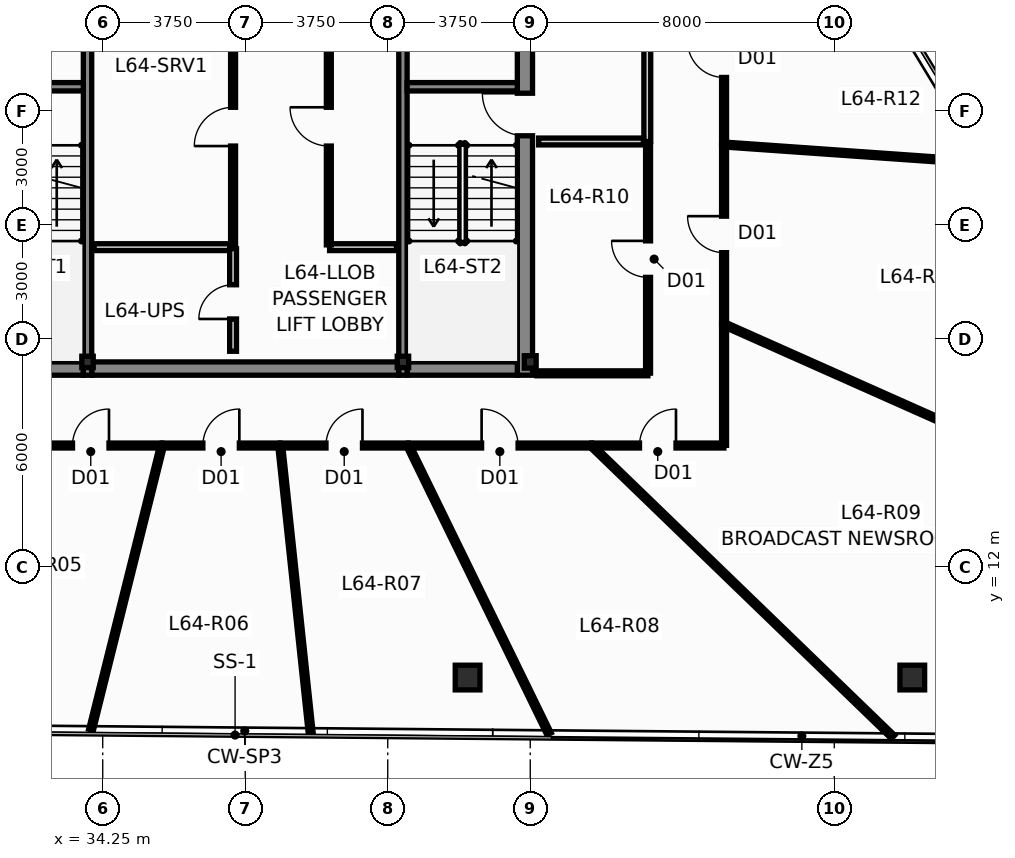
"""IFC4 building model, lengths in metres.
Left out: names, types, materials, properties, quantities, classifications, styles, units other than length and angle.
Written with IfcOpenShell. Run it as: python <this file> out.ifc"""

import sys

from ifc_helpers import new_model, si_unit, direction, frame, frame_2d, origin, origin_2d, place, context, subcontext, project, spatial, rectangle, hollow_rectangle, i_section, extrude, source, transform, mapped, element, fill, save


model = new_model("IFC4")
c1 = context("Model", 3, precision=1e-05, world=origin(), true_north=direction((0.0, 1.0)))
c2 = subcontext(c1, "Body", "Model", "MODEL_VIEW")
j1 = project(units=[si_unit("LENGTHUNIT", "METRE"), si_unit("PLANEANGLEUNIT", "RADIAN")], contexts=[c1])
p1 = place(None, origin())
s1 = spatial("IfcSite", under=j1, at=p1, CompositionType="ELEMENT")
p2 = place(p1, origin())
s2 = spatial("IfcBuilding", under=s1, at=p2, CompositionType="ELEMENT")
p3 = place(p2, frame((0.0, 0.0, 244.45)))
s3 = spatial("IfcBuildingStorey", under=s2, at=p3, CompositionType="ELEMENT", Elevation=244.45)
m1 = source(origin(), c2, "Body", "SweptSolid", [
    extrude(i_section(OverallWidth=0.311, OverallDepth=0.327, WebThickness=0.016, FlangeThickness=0.025, at=origin_2d()), origin(), (0.0, 0.0, 1.0), 3.65),
])
p4 = place(p3, frame((45.5, 17.4, 0.0), z_axis=(0.0, 0.0, 1.0), x_axis=(1.0, 0.0, 0.0)))
e1 = element("IfcColumn", 1, at=p4, inside=s3, PredefinedType="COLUMN", context=c2, shape_type="MappedRepresentation", body=[
    mapped(m1, transform((0.0, 0.0, 0.0), scale=1.0)),
])
m2 = source(origin(), c2, "Body", "SweptSolid", [
    extrude(hollow_rectangle(XDim=0.3, YDim=0.3, WallThickness=0.012, at=origin_2d()), origin(), (0.0, 0.0, 1.0), 3.65),
])
for number, where, z_axis, x_axis in (
    (2, (33.85, 17.4, 0.0), (0.0, 0.0, 1.0), (1.0, 0.0, 0.0)),
    (3, (42.15, 17.4, 0.0), (0.0, 0.0, 1.0), (1.0, 0.0, 0.0)),
):
    element("IfcColumn", number, at=place(p3, frame(where, z_axis=z_axis, x_axis=x_axis)), inside=s3, PredefinedType="COLUMN", context=c2, shape_type="MappedRepresentation", body=[
        mapped(m2, transform((0.0, 0.0, 0.0), scale=1.0)),
    ])
p5 = place(p3, frame((45.36, 17.05, 0.0), z_axis=(0.0, 0.0, 1.0), x_axis=(0.0, 1.0, 0.0)))
e4 = element("IfcWall", 4, at=p5, inside=s3, PredefinedType="SHEAR", context=c2, shape_type="SweptSolid", body=[
    extrude(rectangle(XDim=13.125, YDim=0.4, at=frame_2d((6.562, 0.0))), origin(), (0.0, 0.0, 1.0), 3.65),
])
p6 = place(p5, frame((6.3, 0.0, 0.0)))
e5 = element("IfcOpeningElement", 5, at=p6, cuts=e4, PredefinedType="OPENING", context=c2, shape_type="SweptSolid", body=[
    extrude(rectangle(XDim=1.12, YDim=2.15, at=frame_2d((0.56, 1.075))), frame((0.0, 0.212, 0.0), z_axis=(0.0, -1.0, 0.0), x_axis=(1.0, 0.0, 0.0)), (0.0, 0.0, 1.0), 0.424),
])
p7 = place(p5, frame((10.75, 0.0, 0.0)))
e6 = element("IfcOpeningElement", 6, at=p7, cuts=e4, PredefinedType="OPENING", context=c2, shape_type="SweptSolid", body=[
    extrude(rectangle(XDim=1.2, YDim=2.2, at=frame_2d((0.6, 1.1))), frame((0.0, 0.212, 0.0), z_axis=(0.0, -1.0, 0.0), x_axis=(1.0, 0.0, 0.0)), (0.0, 0.0, 1.0), 0.424),
])
p8 = place(p3, frame((30.84, 17.225, 0.0), z_axis=(0.0, 0.0, 1.0), x_axis=(1.0, 0.0, 0.0)))
e7 = element("IfcWall", 7, at=p8, inside=s3, PredefinedType="SHEAR", context=c2, shape_type="SweptSolid", body=[
    extrude(rectangle(XDim=2.9, YDim=0.35, at=frame_2d((1.45, 0.0))), origin(), (0.0, 0.0, 1.0), 3.65),
])
p9 = place(p3, frame((33.96, 17.225, 0.0), z_axis=(0.0, 0.0, 1.0), x_axis=(1.0, 0.0, 0.0)))
e8 = element("IfcWall", 8, at=p9, inside=s3, PredefinedType="SHEAR", context=c2, shape_type="SweptSolid", body=[
    extrude(rectangle(XDim=8.08, YDim=0.35, at=frame_2d((4.04, 0.0))), origin(), (0.0, 0.0, 1.0), 3.65),
])
p10 = place(p3, frame((42.26, 17.225, 0.0), z_axis=(0.0, 0.0, 1.0), x_axis=(1.0, 0.0, 0.0)))
e9 = element("IfcWall", 9, at=p10, inside=s3, PredefinedType="SHEAR", context=c2, shape_type="SweptSolid", body=[
    extrude(rectangle(XDim=2.9, YDim=0.35, at=frame_2d((1.45, 0.0))), origin(), (0.0, 0.0, 1.0), 3.65),
])
for number, where, z_axis, x_axis in (
    (10, (33.85, 17.05, 0.0), (0.0, 0.0, 1.0), (0.0, 1.0, 0.0)),
    (11, (42.15, 17.05, 0.0), (0.0, 0.0, 1.0), (0.0, 1.0, 0.0)),
):
    element("IfcWall", number, at=place(p3, frame(where, z_axis=z_axis, x_axis=x_axis)), inside=s3, PredefinedType="SHEAR", context=c2, shape_type="SweptSolid", body=[
        extrude(rectangle(XDim=13.125, YDim=0.22, at=frame_2d((6.562, 0.0))), origin(), (0.0, 0.0, 1.0), 3.65),
    ])
for number, where, z_axis, x_axis in (
    (12, (30.84, 24.64, 0.0), (0.0, 0.0, 1.0), (1.0, 0.0, 0.0)),
    (13, (42.26, 24.64, 0.0), (0.0, 0.0, 1.0), (1.0, 0.0, 0.0)),
):
    element("IfcWall", number, at=place(p3, frame(where, z_axis=z_axis, x_axis=x_axis)), inside=s3, PredefinedType="SHEAR", context=c2, shape_type="SweptSolid", body=[
        extrude(rectangle(XDim=2.9, YDim=0.22, at=frame_2d((1.45, 0.0))), origin(), (0.0, 0.0, 1.0), 3.65),
    ])
m3 = source(origin(), c2, "Body", "SweptSolid", [
    extrude(hollow_rectangle(XDim=0.65, YDim=0.65, WallThickness=0.04, at=origin_2d()), origin(), (0.0, 0.0, 1.0), 3.651),
])
p11 = place(p3, frame((43.851, 9.095, 0.0), z_axis=(0.004480382638, 0.019793929266, 0.999794042058), x_axis=(-0.975326687046, 0.220766513622, 0.0)))
e14 = element("IfcColumn", 14, at=p11, inside=s3, PredefinedType="COLUMN", context=c2, shape_type="MappedRepresentation", body=[
    mapped(m3, transform((0.0, 0.0, 0.0), scale=1.0)),
])
m4 = source(origin(), c2, "Body", "SweptSolid", [
    extrude(hollow_rectangle(XDim=0.65, YDim=0.65, WallThickness=0.04, at=origin_2d()), origin(), (0.0, 0.0, 1.0), 3.651),
])
p12 = place(p3, frame((55.553, 9.095, 0.0), z_axis=(0.013440068782, 0.019792340097, 0.999713772949), x_axis=(-0.827290216258, 0.561774775229, 0.0)))
e15 = element("IfcColumn", 15, at=p12, inside=s3, PredefinedType="COLUMN", context=c2, shape_type="MappedRepresentation", body=[
    mapped(m4, transform((0.0, 0.0, 0.0), scale=1.0)),
])
p13 = place(p3, frame((48.58, 23.2, 0.0), z_axis=(0.0, 0.0, 1.0), x_axis=(0.0, 1.0, 0.0)))
e16 = element("IfcWall", 16, at=p13, inside=s3, PredefinedType="PARTITIONING", context=c2, shape_type="SweptSolid", body=[
    extrude(rectangle(XDim=6.4, YDim=0.18, at=frame_2d((3.2, 0.0))), origin(), (0.0, 0.0, 1.0), 3.129),
])
p14 = place(p13, frame((2.65, 0.0, 0.0)))
e17 = element("IfcOpeningElement", 17, at=p14, cuts=e16, PredefinedType="OPENING", context=c2, shape_type="SweptSolid", body=[
    extrude(rectangle(XDim=1.05, YDim=2.15, at=frame_2d((0.525, 1.075))), frame((0.0, 0.102, 0.0), z_axis=(0.0, -1.0, 0.0), x_axis=(1.0, 0.0, 0.0)), (0.0, 0.0, 1.0), 0.204),
])
p15 = place(p3, frame((45.72, 23.2, 0.0), z_axis=(0.0, 0.0, 1.0), x_axis=(1.0, 0.0, 0.0)))
e18 = element("IfcWall", 18, at=p15, inside=s3, PredefinedType="PARTITIONING", context=c2, shape_type="SweptSolid", body=[
    extrude(rectangle(XDim=2.76, YDim=0.18, at=frame_2d((1.38, 0.0))), origin(), (0.0, 0.0, 1.0), 3.4),
])
p16 = place(p3, frame((34.02, 20.42, 0.0), z_axis=(0.0, 0.0, 1.0), x_axis=(1.0, 0.0, 0.0)))
e19 = element("IfcWall", 19, at=p16, inside=s3, PredefinedType="PARTITIONING", context=c2, shape_type="SweptSolid", body=[
    extrude(rectangle(XDim=3.64, YDim=0.18, at=frame_2d((1.82, 0.0))), origin(), (0.0, 0.0, 1.0), 3.4),
])
p17 = place(p3, frame((40.22, 20.42, 0.0), z_axis=(0.0, 0.0, 1.0), x_axis=(1.0, 0.0, 0.0)))
e20 = element("IfcWall", 20, at=p17, inside=s3, PredefinedType="PARTITIONING", context=c2, shape_type="SweptSolid", body=[
    extrude(rectangle(XDim=1.76, YDim=0.18, at=frame_2d((0.88, 0.0))), origin(), (0.0, 0.0, 1.0), 3.4),
])
p18 = place(p3, frame((37.68, 20.48, 0.0), z_axis=(0.0, 0.0, 1.0), x_axis=(0.0, 1.0, 0.0)))
e21 = element("IfcWall", 21, at=p18, inside=s3, PredefinedType="PARTITIONING", context=c2, shape_type="SweptSolid", body=[
    extrude(rectangle(XDim=6.9, YDim=0.13, at=frame_2d((3.45, 0.0))), origin(), (0.0, 0.0, 1.0), 3.4),
])
p19 = place(p18, frame((2.6, 0.0, 0.0)))
e22 = element("IfcOpeningElement", 22, at=p19, cuts=e21, PredefinedType="OPENING", context=c2, shape_type="SweptSolid", body=[
    extrude(rectangle(XDim=1.02, YDim=2.15, at=frame_2d((0.51, 1.075))), frame((0.0, 0.077, 0.0), z_axis=(0.0, -1.0, 0.0), x_axis=(1.0, 0.0, 0.0)), (0.0, 0.0, 1.0), 0.154),
])
p20 = place(p3, frame((40.2, 20.48, 0.0), z_axis=(0.0, 0.0, 1.0), x_axis=(0.0, 1.0, 0.0)))
e23 = element("IfcWall", 23, at=p20, inside=s3, PredefinedType="PARTITIONING", context=c2, shape_type="SweptSolid", body=[
    extrude(rectangle(XDim=6.9, YDim=0.13, at=frame_2d((3.45, 0.0))), origin(), (0.0, 0.0, 1.0), 3.4),
])
p21 = place(p20, frame((2.6, 0.0, 0.0)))
e24 = element("IfcOpeningElement", 24, at=p21, cuts=e23, PredefinedType="OPENING", context=c2, shape_type="SweptSolid", body=[
    extrude(rectangle(XDim=1.02, YDim=2.15, at=frame_2d((0.51, 1.075))), frame((0.0, 0.077, 0.0), z_axis=(0.0, -1.0, 0.0), x_axis=(1.0, 0.0, 0.0)), (0.0, 0.0, 1.0), 0.154),
])
p22 = place(p3, frame((37.68, 17.68, 0.0), z_axis=(0.0, 0.0, 1.0), x_axis=(0.0, 1.0, 0.0)))
e25 = element("IfcWall", 25, at=p22, inside=s3, PredefinedType="PARTITIONING", context=c2, shape_type="SweptSolid", body=[
    extrude(rectangle(XDim=2.7, YDim=0.18, at=frame_2d((1.35, 0.0))), origin(), (0.0, 0.0, 1.0), 3.4),
])
p23 = place(p22, frame((0.85, 0.0, 0.0)))
e26 = element("IfcOpeningElement", 26, at=p23, cuts=e25, PredefinedType="OPENING", context=c2, shape_type="SweptSolid", body=[
    extrude(rectangle(XDim=0.9, YDim=2.1, at=frame_2d((0.45, 1.05))), frame((0.0, 0.102, 0.0), z_axis=(0.0, -1.0, 0.0), x_axis=(1.0, 0.0, 0.0)), (0.0, 0.0, 1.0), 0.204),
])
p24 = place(p3, frame((50.605, 18.388, 0.0), z_axis=(0.0, 0.0, 1.0), x_axis=(0.913601789638, -0.406610095756, 0.0)))
e27 = element("IfcWall", 27, at=p24, inside=s3, PredefinedType="PARTITIONING", context=c2, shape_type="SweptSolid", body=[
    extrude(rectangle(XDim=14.167, YDim=0.13, at=frame_2d((7.083, 0.0))), origin(), (0.0, 0.0, 1.0), 2.985),
])
p25 = place(p3, frame((47.114, 15.197, 0.0), z_axis=(0.0, 0.0, 1.0), x_axis=(0.71904367007, -0.694964891583, 0.0)))
e28 = element("IfcWall", 28, at=p25, inside=s3, PredefinedType="PARTITIONING", context=c2, shape_type="SweptSolid", body=[
    extrude(rectangle(XDim=11.031, YDim=0.13, at=frame_2d((5.516, 0.0))), origin(), (0.0, 0.0, 1.0), 3.4),
])
p26 = place(p3, frame((42.292, 15.196, 0.0), z_axis=(0.0, 0.0, 1.0), x_axis=(0.438770116062, -0.898599346345, 0.0)))
e29 = element("IfcWall", 29, at=p26, inside=s3, PredefinedType="PARTITIONING", context=c2, shape_type="SweptSolid", body=[
    extrude(rectangle(XDim=8.44, YDim=0.13, at=frame_2d((4.22, 0.0))), origin(), (0.0, 0.0, 1.0), 3.4),
])
p27 = place(p3, frame((33.943, 7.721, 0.0), z_axis=(0.0, 0.0, 1.0), x_axis=(0.242274634851, 0.970207710394, 0.0)))
e30 = element("IfcWall", 30, at=p27, inside=s3, PredefinedType="PARTITIONING", context=c2, shape_type="SweptSolid", body=[
    extrude(rectangle(XDim=7.704, YDim=0.13, at=frame_2d((3.852, 0.0))), origin(), (0.0, 0.0, 1.0), 3.4),
])
p28 = place(p3, frame((38.921, 15.195, 0.0), z_axis=(0.0, 0.0, 1.0), x_axis=(0.105512559397, -0.994417970377, 0.0)))
e31 = element("IfcWall", 31, at=p28, inside=s3, PredefinedType="PARTITIONING", context=c2, shape_type="SweptSolid", body=[
    extrude(rectangle(XDim=7.569, YDim=0.13, at=frame_2d((3.784, 0.0))), origin(), (0.0, 0.0, 1.0), 3.4),
])
p29 = place(p3, frame((50.605, 23.12, 0.0), z_axis=(0.0, 0.0, 1.0), x_axis=(0.997548063957, -0.069984713305, 0.0)))
e32 = element("IfcWall", 32, at=p29, inside=s3, PredefinedType="PARTITIONING", context=c2, shape_type="SweptSolid", body=[
    extrude(rectangle(XDim=6.886, YDim=0.13, at=frame_2d((3.443, 0.0))), origin(), (0.0, 0.0, 1.0), 3.4),
])
p30 = place(p3, frame((48.6, 17.105, 0.0), z_axis=(0.0, 0.0, 1.0), x_axis=(0.0, 1.0, 0.0)))
e33 = element("IfcWall", 33, at=p30, inside=s3, PredefinedType="PARTITIONING", context=c2, shape_type="SweptSolid", body=[
    extrude(rectangle(XDim=6.0, YDim=0.13, at=frame_2d((3.0, 0.0))), origin(), (0.0, 0.0, 1.0), 3.4),
])
p31 = place(p30, frame((2.52, 0.0, 0.0)))
e34 = element("IfcOpeningElement", 34, at=p31, cuts=e33, PredefinedType="OPENING", context=c2, shape_type="SweptSolid", body=[
    extrude(rectangle(XDim=0.96, YDim=2.15, at=frame_2d((0.48, 1.075))), frame((0.0, 0.077, 0.0), z_axis=(0.0, -1.0, 0.0), x_axis=(1.0, 0.0, 0.0)), (0.0, 0.0, 1.0), 0.154),
])
p32 = place(p3, frame((42.295, 15.2, 0.0), z_axis=(0.0, 0.0, 1.0), x_axis=(1.0, 0.0, 0.0)))
e35 = element("IfcWall", 35, at=p32, inside=s3, PredefinedType="PARTITIONING", context=c2, shape_type="SweptSolid", body=[
    extrude(rectangle(XDim=4.81, YDim=0.13, at=frame_2d((2.405, 0.0))), origin(), (0.0, 0.0, 1.0), 3.129),
])
p33 = place(p32, frame((1.925, 0.0, 0.0)))
e36 = element("IfcOpeningElement", 36, at=p33, cuts=e35, PredefinedType="OPENING", context=c2, shape_type="SweptSolid", body=[
    extrude(rectangle(XDim=0.96, YDim=2.15, at=frame_2d((0.48, 1.075))), frame((0.0, 0.077, 0.0), z_axis=(0.0, -1.0, 0.0), x_axis=(1.0, 0.0, 0.0)), (0.0, 0.0, 1.0), 0.154),
])
p34 = place(p3, frame((50.6, 18.395, 0.0), z_axis=(0.0, 0.0, 1.0), x_axis=(0.0, 1.0, 0.0)))
e37 = element("IfcWall", 37, at=p34, inside=s3, PredefinedType="PARTITIONING", context=c2, shape_type="SweptSolid", body=[
    extrude(rectangle(XDim=4.72, YDim=0.13, at=frame_2d((2.36, 0.0))), origin(), (0.0, 0.0, 1.0), 3.129),
])
p35 = place(p34, frame((1.88, 0.0, 0.0)))
e38 = element("IfcOpeningElement", 38, at=p35, cuts=e37, PredefinedType="OPENING", context=c2, shape_type="SweptSolid", body=[
    extrude(rectangle(XDim=0.96, YDim=2.15, at=frame_2d((0.48, 1.075))), frame((0.0, 0.077, 0.0), z_axis=(0.0, -1.0, 0.0), x_axis=(1.0, 0.0, 0.0)), (0.0, 0.0, 1.0), 0.154),
])
p36 = place(p3, frame((50.6, 23.125, 0.0), z_axis=(0.0, 0.0, 1.0), x_axis=(0.0, 1.0, 0.0)))
e39 = element("IfcWall", 39, at=p36, inside=s3, PredefinedType="PARTITIONING", context=c2, shape_type="SweptSolid", body=[
    extrude(rectangle(XDim=4.48, YDim=0.13, at=frame_2d((2.24, 0.0))), origin(), (0.0, 0.0, 1.0), 3.129),
])
p37 = place(p36, frame((1.76, 0.0, 0.0)))
e40 = element("IfcOpeningElement", 40, at=p37, cuts=e39, PredefinedType="OPENING", context=c2, shape_type="SweptSolid", body=[
    extrude(rectangle(XDim=0.96, YDim=2.15, at=frame_2d((0.48, 1.075))), frame((0.0, 0.077, 0.0), z_axis=(0.0, -1.0, 0.0), x_axis=(1.0, 0.0, 0.0)), (0.0, 0.0, 1.0), 0.154),
])
p38 = place(p3, frame((32.065, 15.2, 0.0), z_axis=(0.0, 0.0, 1.0), x_axis=(1.0, 0.0, 0.0)))
e41 = element("IfcWall", 41, at=p38, inside=s3, PredefinedType="PARTITIONING", context=c2, shape_type="SweptSolid", body=[
    extrude(rectangle(XDim=3.74, YDim=0.13, at=frame_2d((1.87, 0.0))), origin(), (0.0, 0.0, 1.0), 3.129),
])
p39 = place(p38, frame((1.39, 0.0, 0.0)))
e42 = element("IfcOpeningElement", 42, at=p39, cuts=e41, PredefinedType="OPENING", context=c2, shape_type="SweptSolid", body=[
    extrude(rectangle(XDim=0.96, YDim=2.15, at=frame_2d((0.48, 1.075))), frame((0.0, 0.077, 0.0), z_axis=(0.0, -1.0, 0.0), x_axis=(1.0, 0.0, 0.0)), (0.0, 0.0, 1.0), 0.154),
])
p40 = place(p3, frame((47.115, 15.2, 0.0), z_axis=(0.0, 0.0, 1.0), x_axis=(1.0, 0.0, 0.0)))
e43 = element("IfcWall", 43, at=p40, inside=s3, PredefinedType="PARTITIONING", context=c2, shape_type="SweptSolid", body=[
    extrude(rectangle(XDim=3.48, YDim=0.13, at=frame_2d((1.74, 0.0))), origin(), (0.0, 0.0, 1.0), 3.129),
])
p41 = place(p40, frame((1.26, 0.0, 0.0)))
e44 = element("IfcOpeningElement", 44, at=p41, cuts=e43, PredefinedType="OPENING", context=c2, shape_type="SweptSolid", body=[
    extrude(rectangle(XDim=0.96, YDim=2.15, at=frame_2d((0.48, 1.075))), frame((0.0, 0.077, 0.0), z_axis=(0.0, -1.0, 0.0), x_axis=(1.0, 0.0, 0.0)), (0.0, 0.0, 1.0), 0.154),
])
p42 = place(p3, frame((38.925, 15.2, 0.0), z_axis=(0.0, 0.0, 1.0), x_axis=(1.0, 0.0, 0.0)))
e45 = element("IfcWall", 45, at=p42, inside=s3, PredefinedType="PARTITIONING", context=c2, shape_type="SweptSolid", body=[
    extrude(rectangle(XDim=3.36, YDim=0.13, at=frame_2d((1.68, 0.0))), origin(), (0.0, 0.0, 1.0), 3.129),
])
p43 = place(p42, frame((1.2, 0.0, 0.0)))
e46 = element("IfcOpeningElement", 46, at=p43, cuts=e45, PredefinedType="OPENING", context=c2, shape_type="SweptSolid", body=[
    extrude(rectangle(XDim=0.96, YDim=2.15, at=frame_2d((0.48, 1.075))), frame((0.0, 0.077, 0.0), z_axis=(0.0, -1.0, 0.0), x_axis=(1.0, 0.0, 0.0)), (0.0, 0.0, 1.0), 0.154),
])
p44 = place(p3, frame((50.6, 15.205, 0.0), z_axis=(0.0, 0.0, 1.0), x_axis=(0.0, 1.0, 0.0)))
e47 = element("IfcWall", 47, at=p44, inside=s3, PredefinedType="PARTITIONING", context=c2, shape_type="SweptSolid", body=[
    extrude(rectangle(XDim=3.18, YDim=0.13, at=frame_2d((1.59, 0.0))), origin(), (0.0, 0.0, 1.0), 3.129),
])
p45 = place(p3, frame((35.815, 15.2, 0.0), z_axis=(0.0, 0.0, 1.0), x_axis=(1.0, 0.0, 0.0)))
e48 = element("IfcWall", 48, at=p45, inside=s3, PredefinedType="PARTITIONING", context=c2, shape_type="SweptSolid", body=[
    extrude(rectangle(XDim=3.1, YDim=0.13, at=frame_2d((1.55, 0.0))), origin(), (0.0, 0.0, 1.0), 3.129),
])
p46 = place(p45, frame((1.07, 0.0, 0.0)))
e49 = element("IfcOpeningElement", 49, at=p46, cuts=e48, PredefinedType="OPENING", context=c2, shape_type="SweptSolid", body=[
    extrude(rectangle(XDim=0.96, YDim=2.15, at=frame_2d((0.48, 1.075))), frame((0.0, 0.077, 0.0), z_axis=(0.0, -1.0, 0.0), x_axis=(1.0, 0.0, 0.0)), (0.0, 0.0, 1.0), 0.154),
])
p47 = place(p3, frame((45.675, 17.1, 0.0), z_axis=(0.0, 0.0, 1.0), x_axis=(1.0, 0.0, 0.0)))
e50 = element("IfcWall", 50, at=p47, inside=s3, PredefinedType="PARTITIONING", context=c2, shape_type="SweptSolid", body=[
    extrude(rectangle(XDim=2.92, YDim=0.13, at=frame_2d((1.46, 0.0))), origin(), (0.0, 0.0, 1.0), 2.985),
])
p48 = place(p6, origin())
e51 = element("IfcDoor", 51, at=p48, inside=s3, OperationType="SINGLE_SWING_RIGHT", PredefinedType="DOOR", context=c2, shape_type="SweptSolid", body=[
    extrude(rectangle(XDim=1.12, YDim=2.15, at=frame_2d((0.56, 1.075))), frame((0.0, 0.025, 0.0), z_axis=(0.0, -1.0, 0.0), x_axis=(1.0, 0.0, 0.0)), (0.0, 0.0, 1.0), 0.05),
])
fill(e5, e51)
p49 = place(p19, origin())
e52 = element("IfcDoor", 52, at=p49, inside=s3, OperationType="SINGLE_SWING_LEFT", PredefinedType="DOOR", context=c2, shape_type="SweptSolid", body=[
    extrude(rectangle(XDim=1.02, YDim=2.15, at=frame_2d((0.51, 1.075))), frame((0.0, 0.025, 0.0), z_axis=(0.0, -1.0, 0.0), x_axis=(1.0, 0.0, 0.0)), (0.0, 0.0, 1.0), 0.05),
])
fill(e22, e52)
p50 = place(p21, origin())
e53 = element("IfcDoor", 53, at=p50, inside=s3, OperationType="SINGLE_SWING_RIGHT", PredefinedType="DOOR", context=c2, shape_type="SweptSolid", body=[
    extrude(rectangle(XDim=1.02, YDim=2.15, at=frame_2d((0.51, 1.075))), frame((0.0, 0.025, 0.0), z_axis=(0.0, -1.0, 0.0), x_axis=(1.0, 0.0, 0.0)), (0.0, 0.0, 1.0), 0.05),
])
fill(e24, e53)
p51 = place(p23, origin())
e54 = element("IfcDoor", 54, at=p51, inside=s3, OperationType="SINGLE_SWING_LEFT", PredefinedType="DOOR", context=c2, shape_type="SweptSolid", body=[
    extrude(rectangle(XDim=0.9, YDim=2.1, at=frame_2d((0.45, 1.05))), frame((0.0, 0.025, 0.0), z_axis=(0.0, -1.0, 0.0), x_axis=(1.0, 0.0, 0.0)), (0.0, 0.0, 1.0), 0.05),
])
fill(e26, e54)
p52 = place(p31, origin())
e55 = element("IfcDoor", 55, at=p52, inside=s3, OperationType="SINGLE_SWING_RIGHT", PredefinedType="DOOR", context=c2, shape_type="SweptSolid", body=[
    extrude(rectangle(XDim=0.96, YDim=2.15, at=frame_2d((0.48, 1.075))), frame((0.0, 0.025, 0.0), z_axis=(0.0, -1.0, 0.0), x_axis=(1.0, 0.0, 0.0)), (0.0, 0.0, 1.0), 0.05),
])
fill(e34, e55)
p53 = place(p33, origin())
e56 = element("IfcDoor", 56, at=p53, inside=s3, OperationType="SINGLE_SWING_LEFT", PredefinedType="DOOR", context=c2, shape_type="SweptSolid", body=[
    extrude(rectangle(XDim=0.96, YDim=2.15, at=frame_2d((0.48, 1.075))), frame((0.0, 0.025, 0.0), z_axis=(0.0, -1.0, 0.0), x_axis=(1.0, 0.0, 0.0)), (0.0, 0.0, 1.0), 0.05),
])
fill(e36, e56)
p54 = place(p35, origin())
e57 = element("IfcDoor", 57, at=p54, inside=s3, OperationType="SINGLE_SWING_RIGHT", PredefinedType="DOOR", context=c2, shape_type="SweptSolid", body=[
    extrude(rectangle(XDim=0.96, YDim=2.15, at=frame_2d((0.48, 1.075))), frame((0.0, 0.025, 0.0), z_axis=(0.0, -1.0, 0.0), x_axis=(1.0, 0.0, 0.0)), (0.0, 0.0, 1.0), 0.05),
])
fill(e38, e57)
p55 = place(p37, origin())
e58 = element("IfcDoor", 58, at=p55, inside=s3, OperationType="SINGLE_SWING_RIGHT", PredefinedType="DOOR", context=c2, shape_type="SweptSolid", body=[
    extrude(rectangle(XDim=0.96, YDim=2.15, at=frame_2d((0.48, 1.075))), frame((0.0, 0.025, 0.0), z_axis=(0.0, -1.0, 0.0), x_axis=(1.0, 0.0, 0.0)), (0.0, 0.0, 1.0), 0.05),
])
fill(e40, e58)
p56 = place(p39, origin())
e59 = element("IfcDoor", 59, at=p56, inside=s3, OperationType="SINGLE_SWING_RIGHT", PredefinedType="DOOR", context=c2, shape_type="SweptSolid", body=[
    extrude(rectangle(XDim=0.96, YDim=2.15, at=frame_2d((0.48, 1.075))), frame((0.0, 0.025, 0.0), z_axis=(0.0, -1.0, 0.0), x_axis=(1.0, 0.0, 0.0)), (0.0, 0.0, 1.0), 0.05),
])
fill(e42, e59)
p57 = place(p41, origin())
e60 = element("IfcDoor", 60, at=p57, inside=s3, OperationType="SINGLE_SWING_RIGHT", PredefinedType="DOOR", context=c2, shape_type="SweptSolid", body=[
    extrude(rectangle(XDim=0.96, YDim=2.15, at=frame_2d((0.48, 1.075))), frame((0.0, 0.025, 0.0), z_axis=(0.0, -1.0, 0.0), x_axis=(1.0, 0.0, 0.0)), (0.0, 0.0, 1.0), 0.05),
])
fill(e44, e60)
p58 = place(p43, origin())
e61 = element("IfcDoor", 61, at=p58, inside=s3, OperationType="SINGLE_SWING_RIGHT", PredefinedType="DOOR", context=c2, shape_type="SweptSolid", body=[
    extrude(rectangle(XDim=0.96, YDim=2.15, at=frame_2d((0.48, 1.075))), frame((0.0, 0.025, 0.0), z_axis=(0.0, -1.0, 0.0), x_axis=(1.0, 0.0, 0.0)), (0.0, 0.0, 1.0), 0.05),
])
fill(e46, e61)
p59 = place(p46, origin())
e62 = element("IfcDoor", 62, at=p59, inside=s3, OperationType="SINGLE_SWING_RIGHT", PredefinedType="DOOR", context=c2, shape_type="SweptSolid", body=[
    extrude(rectangle(XDim=0.96, YDim=2.15, at=frame_2d((0.48, 1.075))), frame((0.0, 0.025, 0.0), z_axis=(0.0, -1.0, 0.0), x_axis=(1.0, 0.0, 0.0)), (0.0, 0.0, 1.0), 0.05),
])
fill(e49, e62)
save(model, sys.argv[1])
